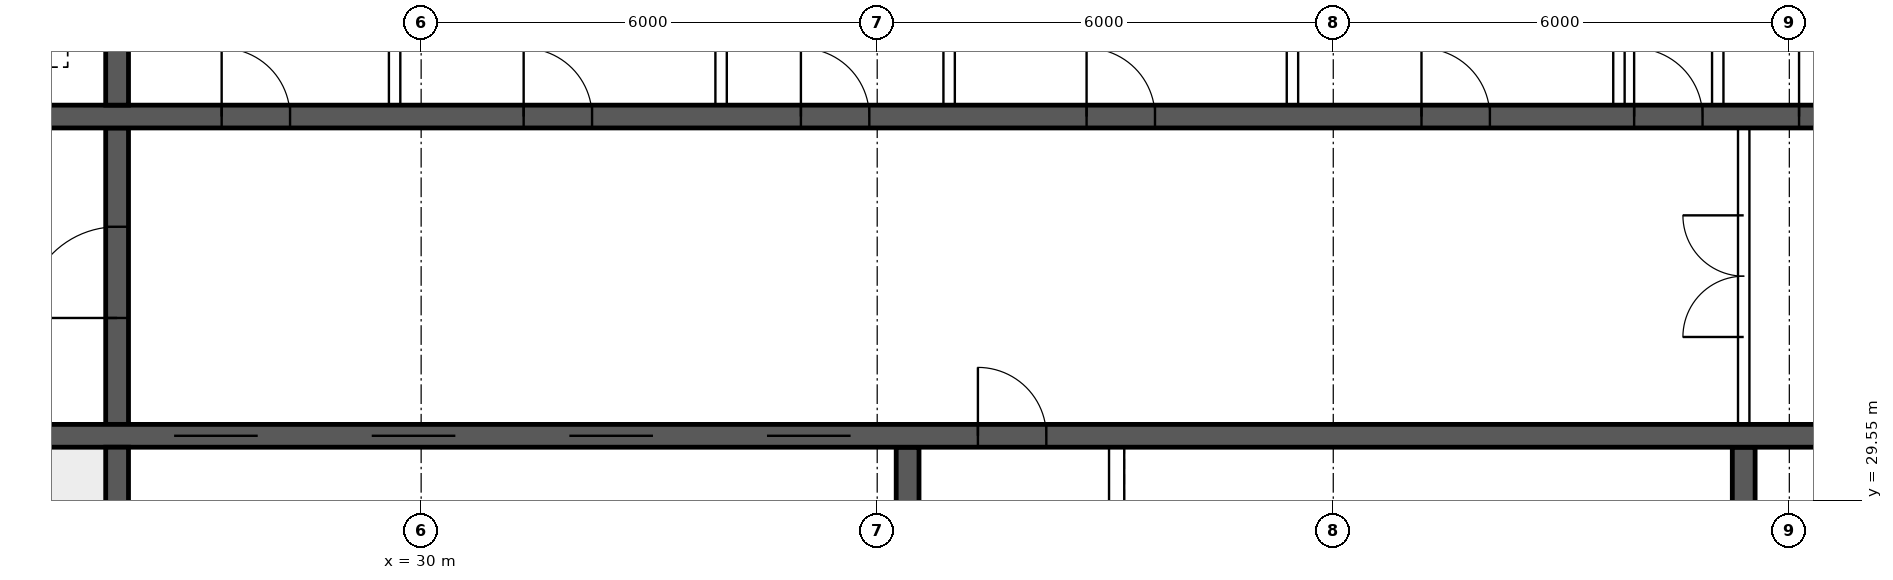
"""IFC4 building model, lengths in metres.
Left out: names, types, materials, properties, quantities, classifications, styles, units other than length and angle.
Written with IfcOpenShell. Run it as: python <this file> out.ifc"""

import sys

from ifc_helpers import new_model, si_unit, direction, frame, frame_2d, origin, place, context, subcontext, project, spatial, rectangle, extrude, element, fill, save


model = new_model("IFC4")
c1 = context("Model", 3, precision=1e-05, world=origin(), true_north=direction((0.0, 1.0)))
c2 = subcontext(c1, "Body", "Model", "MODEL_VIEW")
j1 = project(units=[si_unit("LENGTHUNIT", "METRE"), si_unit("PLANEANGLEUNIT", "RADIAN")], contexts=[c1])
p1 = place(None, origin())
s1 = spatial("IfcSite", under=j1, at=p1, CompositionType="ELEMENT")
p2 = place(p1, origin())
s2 = spatial("IfcBuilding", under=s1, at=p2, CompositionType="ELEMENT")
p3 = place(p2, frame((0.0, 0.0, 103.15)))
s3 = spatial("IfcBuildingStorey", under=s2, at=p3, CompositionType="ELEMENT", Elevation=103.15)
p4 = place(p3, frame((18.475, 30.4, 0.0), z_axis=(0.0, 0.0, 1.0), x_axis=(1.0, 0.0, 0.0)))
e1 = element("IfcWall", 1, at=p4, inside=s3, PredefinedType="SHEAR", context=c2, shape_type="SweptSolid", body=[
    extrude(rectangle(XDim=47.05, YDim=0.3, at=frame_2d((23.525, 0.0))), origin(), (0.0, 0.0, 1.0), 3.75),
])
p5 = place(p4, frame((0.4, 0.0, 0.0)))
e2 = element("IfcOpeningElement", 2, at=p5, cuts=e1, PredefinedType="OPENING", context=c2, shape_type="SweptSolid", body=[
    extrude(rectangle(XDim=1.0, YDim=2.1, at=frame_2d((0.5, 1.05))), frame((0.0, 0.16, 0.0), z_axis=(0.0, -1.0, 0.0), x_axis=(1.0, 0.0, 0.0)), (0.0, 0.0, 1.0), 0.32),
])
p6 = place(p4, frame((45.65, 0.0, 0.0)))
e3 = element("IfcOpeningElement", 3, at=p6, cuts=e1, PredefinedType="OPENING", context=c2, shape_type="SweptSolid", body=[
    extrude(rectangle(XDim=1.0, YDim=2.1, at=frame_2d((0.5, 1.05))), frame((0.0, 0.16, 0.0), z_axis=(0.0, -1.0, 0.0), x_axis=(1.0, 0.0, 0.0)), (0.0, 0.0, 1.0), 0.32),
])
p7 = place(p4, frame((8.275, 0.0, 0.0)))
e4 = element("IfcOpeningElement", 4, at=p7, cuts=e1, PredefinedType="OPENING", context=c2, shape_type="SweptSolid", body=[
    extrude(rectangle(XDim=1.1, YDim=2.1, at=frame_2d((0.55, 1.05))), frame((0.0, 0.16, 0.0), z_axis=(0.0, -1.0, 0.0), x_axis=(1.0, 0.0, 0.0)), (0.0, 0.0, 1.0), 0.32),
])
p8 = place(p4, frame((10.875, 0.0, 0.0)))
e5 = element("IfcOpeningElement", 5, at=p8, cuts=e1, PredefinedType="OPENING", context=c2, shape_type="SweptSolid", body=[
    extrude(rectangle(XDim=1.1, YDim=2.1, at=frame_2d((0.55, 1.05))), frame((0.0, 0.16, 0.0), z_axis=(0.0, -1.0, 0.0), x_axis=(1.0, 0.0, 0.0)), (0.0, 0.0, 1.0), 0.32),
])
p9 = place(p4, frame((13.475, 0.0, 0.0)))
e6 = element("IfcOpeningElement", 6, at=p9, cuts=e1, PredefinedType="OPENING", context=c2, shape_type="SweptSolid", body=[
    extrude(rectangle(XDim=1.1, YDim=2.1, at=frame_2d((0.55, 1.05))), frame((0.0, 0.16, 0.0), z_axis=(0.0, -1.0, 0.0), x_axis=(1.0, 0.0, 0.0)), (0.0, 0.0, 1.0), 0.32),
])
p10 = place(p4, frame((16.075, 0.0, 0.0)))
e7 = element("IfcOpeningElement", 7, at=p10, cuts=e1, PredefinedType="OPENING", context=c2, shape_type="SweptSolid", body=[
    extrude(rectangle(XDim=1.1, YDim=2.1, at=frame_2d((0.55, 1.05))), frame((0.0, 0.16, 0.0), z_axis=(0.0, -1.0, 0.0), x_axis=(1.0, 0.0, 0.0)), (0.0, 0.0, 1.0), 0.32),
])
p11 = place(p4, frame((18.85, 0.0, 0.0)))
e8 = element("IfcOpeningElement", 8, at=p11, cuts=e1, PredefinedType="OPENING", context=c2, shape_type="SweptSolid", body=[
    extrude(rectangle(XDim=0.9, YDim=2.1, at=frame_2d((0.45, 1.05))), frame((0.0, 0.16, 0.0), z_axis=(0.0, -1.0, 0.0), x_axis=(1.0, 0.0, 0.0)), (0.0, 0.0, 1.0), 0.32),
])
p12 = place(p4, frame((30.142, 0.0, 0.0)))
e9 = element("IfcOpeningElement", 9, at=p12, cuts=e1, PredefinedType="OPENING", context=c2, shape_type="SweptSolid", body=[
    extrude(rectangle(XDim=1.1, YDim=2.1, at=frame_2d((0.55, 1.05))), frame((0.0, 0.16, 0.0), z_axis=(0.0, -1.0, 0.0), x_axis=(1.0, 0.0, 0.0)), (0.0, 0.0, 1.0), 0.32),
])
p13 = place(p4, frame((33.675, 0.0, 0.0)))
e10 = element("IfcOpeningElement", 10, at=p13, cuts=e1, PredefinedType="OPENING", context=c2, shape_type="SweptSolid", body=[
    extrude(rectangle(XDim=1.1, YDim=2.1, at=frame_2d((0.55, 1.05))), frame((0.0, 0.16, 0.0), z_axis=(0.0, -1.0, 0.0), x_axis=(1.0, 0.0, 0.0)), (0.0, 0.0, 1.0), 0.32),
])
p14 = place(p4, frame((37.208, 0.0, 0.0)))
e11 = element("IfcOpeningElement", 11, at=p14, cuts=e1, PredefinedType="OPENING", context=c2, shape_type="SweptSolid", body=[
    extrude(rectangle(XDim=1.1, YDim=2.1, at=frame_2d((0.55, 1.05))), frame((0.0, 0.16, 0.0), z_axis=(0.0, -1.0, 0.0), x_axis=(1.0, 0.0, 0.0)), (0.0, 0.0, 1.0), 0.32),
])
p15 = place(p3, frame((18.475, 34.6, 0.0), z_axis=(0.0, 0.0, 1.0), x_axis=(1.0, 0.0, 0.0)))
e12 = element("IfcWall", 12, at=p15, inside=s3, PredefinedType="SHEAR", context=c2, shape_type="SweptSolid", body=[
    extrude(rectangle(XDim=47.05, YDim=0.3, at=frame_2d((23.525, 0.0))), origin(), (0.0, 0.0, 1.0), 3.75),
])
p16 = place(p15, frame((0.9, 0.0, 0.0)))
e13 = element("IfcOpeningElement", 13, at=p16, cuts=e12, PredefinedType="OPENING", context=c2, shape_type="SweptSolid", body=[
    extrude(rectangle(XDim=1.1, YDim=2.1, at=frame_2d((0.55, 1.05))), frame((0.0, 0.16, 0.0), z_axis=(0.0, -1.0, 0.0), x_axis=(1.0, 0.0, 0.0)), (0.0, 0.0, 1.0), 0.32),
])
p17 = place(p15, frame((45.05, 0.0, 0.0)))
e14 = element("IfcOpeningElement", 14, at=p17, cuts=e12, PredefinedType="OPENING", context=c2, shape_type="SweptSolid", body=[
    extrude(rectangle(XDim=1.1, YDim=2.1, at=frame_2d((0.55, 1.05))), frame((0.0, 0.16, 0.0), z_axis=(0.0, -1.0, 0.0), x_axis=(1.0, 0.0, 0.0)), (0.0, 0.0, 1.0), 0.32),
])
p18 = place(p15, frame((4.125, 0.0, 0.0)))
e15 = element("IfcOpeningElement", 15, at=p18, cuts=e12, PredefinedType="OPENING", context=c2, shape_type="SweptSolid", body=[
    extrude(rectangle(XDim=0.9, YDim=2.1, at=frame_2d((0.45, 1.05))), frame((0.0, 0.16, 0.0), z_axis=(0.0, -1.0, 0.0), x_axis=(1.0, 0.0, 0.0)), (0.0, 0.0, 1.0), 0.32),
])
p19 = place(p15, frame((42.025, 0.0, 0.0)))
e16 = element("IfcOpeningElement", 16, at=p19, cuts=e12, PredefinedType="OPENING", context=c2, shape_type="SweptSolid", body=[
    extrude(rectangle(XDim=0.9, YDim=2.1, at=frame_2d((0.45, 1.05))), frame((0.0, 0.16, 0.0), z_axis=(0.0, -1.0, 0.0), x_axis=(1.0, 0.0, 0.0)), (0.0, 0.0, 1.0), 0.32),
])
p20 = place(p15, frame((8.9, 0.0, 0.0)))
e17 = element("IfcOpeningElement", 17, at=p20, cuts=e12, PredefinedType="OPENING", context=c2, shape_type="SweptSolid", body=[
    extrude(rectangle(XDim=0.9, YDim=2.1, at=frame_2d((0.45, 1.05))), frame((0.0, 0.16, 0.0), z_axis=(0.0, -1.0, 0.0), x_axis=(1.0, 0.0, 0.0)), (0.0, 0.0, 1.0), 0.32),
])
p21 = place(p15, frame((12.874, 0.0, 0.0)))
e18 = element("IfcOpeningElement", 18, at=p21, cuts=e12, PredefinedType="OPENING", context=c2, shape_type="SweptSolid", body=[
    extrude(rectangle(XDim=0.9, YDim=2.1, at=frame_2d((0.45, 1.05))), frame((0.0, 0.16, 0.0), z_axis=(0.0, -1.0, 0.0), x_axis=(1.0, 0.0, 0.0)), (0.0, 0.0, 1.0), 0.32),
])
p22 = place(p15, frame((16.521, 0.0, 0.0)))
e19 = element("IfcOpeningElement", 19, at=p22, cuts=e12, PredefinedType="OPENING", context=c2, shape_type="SweptSolid", body=[
    extrude(rectangle(XDim=0.9, YDim=2.1, at=frame_2d((0.45, 1.05))), frame((0.0, 0.16, 0.0), z_axis=(0.0, -1.0, 0.0), x_axis=(1.0, 0.0, 0.0)), (0.0, 0.0, 1.0), 0.32),
])
p23 = place(p15, frame((20.28, 0.0, 0.0)))
e20 = element("IfcOpeningElement", 20, at=p23, cuts=e12, PredefinedType="OPENING", context=c2, shape_type="SweptSolid", body=[
    extrude(rectangle(XDim=0.9, YDim=2.1, at=frame_2d((0.45, 1.05))), frame((0.0, 0.16, 0.0), z_axis=(0.0, -1.0, 0.0), x_axis=(1.0, 0.0, 0.0)), (0.0, 0.0, 1.0), 0.32),
])
p24 = place(p15, frame((24.686, 0.0, 0.0)))
e21 = element("IfcOpeningElement", 21, at=p24, cuts=e12, PredefinedType="OPENING", context=c2, shape_type="SweptSolid", body=[
    extrude(rectangle(XDim=0.9, YDim=2.1, at=frame_2d((0.45, 1.05))), frame((0.0, 0.16, 0.0), z_axis=(0.0, -1.0, 0.0), x_axis=(1.0, 0.0, 0.0)), (0.0, 0.0, 1.0), 0.32),
])
p25 = place(p15, frame((27.483, 0.0, 0.0)))
e22 = element("IfcOpeningElement", 22, at=p25, cuts=e12, PredefinedType="OPENING", context=c2, shape_type="SweptSolid", body=[
    extrude(rectangle(XDim=0.9, YDim=2.1, at=frame_2d((0.45, 1.05))), frame((0.0, 0.16, 0.0), z_axis=(0.0, -1.0, 0.0), x_axis=(1.0, 0.0, 0.0)), (0.0, 0.0, 1.0), 0.32),
])
p26 = place(p15, frame((29.653, 0.0, 0.0)))
e23 = element("IfcOpeningElement", 23, at=p26, cuts=e12, PredefinedType="OPENING", context=c2, shape_type="SweptSolid", body=[
    extrude(rectangle(XDim=0.9, YDim=2.1, at=frame_2d((0.45, 1.05))), frame((0.0, 0.16, 0.0), z_axis=(0.0, -1.0, 0.0), x_axis=(1.0, 0.0, 0.0)), (0.0, 0.0, 1.0), 0.32),
])
p27 = place(p15, frame((33.452, 0.0, 0.0)))
e24 = element("IfcOpeningElement", 24, at=p27, cuts=e12, PredefinedType="OPENING", context=c2, shape_type="SweptSolid", body=[
    extrude(rectangle(XDim=0.9, YDim=2.1, at=frame_2d((0.45, 1.05))), frame((0.0, 0.16, 0.0), z_axis=(0.0, -1.0, 0.0), x_axis=(1.0, 0.0, 0.0)), (0.0, 0.0, 1.0), 0.32),
])
p28 = place(p15, frame((37.403, 0.0, 0.0)))
e25 = element("IfcOpeningElement", 25, at=p28, cuts=e12, PredefinedType="OPENING", context=c2, shape_type="SweptSolid", body=[
    extrude(rectangle(XDim=0.9, YDim=2.1, at=frame_2d((0.45, 1.05))), frame((0.0, 0.16, 0.0), z_axis=(0.0, -1.0, 0.0), x_axis=(1.0, 0.0, 0.0)), (0.0, 0.0, 1.0), 0.32),
])
p29 = place(p3, frame((26.0, 26.275, 0.0), z_axis=(0.0, 0.0, 1.0), x_axis=(0.0, 1.0, 0.0)))
e26 = element("IfcWall", 26, at=p29, inside=s3, PredefinedType="SHEAR", context=c2, shape_type="SweptSolid", body=[
    extrude(rectangle(XDim=3.975, YDim=0.3, at=frame_2d((1.988, 0.0))), origin(), (0.0, 0.0, 1.0), 3.75),
])
p30 = place(p3, frame((26.0, 30.55, 0.0), z_axis=(0.0, 0.0, 1.0), x_axis=(0.0, 1.0, 0.0)))
e27 = element("IfcWall", 27, at=p30, inside=s3, PredefinedType="SHEAR", context=c2, shape_type="SweptSolid", body=[
    extrude(rectangle(XDim=3.9, YDim=0.3, at=frame_2d((1.95, 0.0))), origin(), (0.0, 0.0, 1.0), 3.75),
])
p31 = place(p30, frame((1.4, 0.0, 0.0)))
e28 = element("IfcOpeningElement", 28, at=p31, cuts=e27, PredefinedType="OPENING", context=c2, shape_type="SweptSolid", body=[
    extrude(rectangle(XDim=1.2, YDim=2.1, at=frame_2d((0.6, 1.05))), frame((0.0, 0.16, 0.0), z_axis=(0.0, -1.0, 0.0), x_axis=(1.0, 0.0, 0.0)), (0.0, 0.0, 1.0), 0.32),
])
p32 = place(p3, frame((26.0, 34.75, 0.0), z_axis=(0.0, 0.0, 1.0), x_axis=(0.0, 1.0, 0.0)))
e29 = element("IfcWall", 29, at=p32, inside=s3, PredefinedType="SHEAR", context=c2, shape_type="SweptSolid", body=[
    extrude(rectangle(XDim=2.975, YDim=0.3, at=frame_2d((1.488, 0.0))), origin(), (0.0, 0.0, 1.0), 3.75),
])
for number, where, z_axis, x_axis in (
    (30, (36.4, 26.275, 0.0), (0.0, 0.0, 1.0), (0.0, 1.0, 0.0)),
    (31, (47.4, 26.275, 0.0), (0.0, 0.0, 1.0), (0.0, 1.0, 0.0)),
):
    element("IfcWall", number, at=place(p3, frame(where, z_axis=z_axis, x_axis=x_axis)), inside=s3, PredefinedType="SHEAR", context=c2, shape_type="SweptSolid", body=[
        extrude(rectangle(XDim=3.975, YDim=0.3, at=frame_2d((1.988, 0.0))), origin(), (0.0, 0.0, 1.0), 3.75),
    ])
p33 = place(p3, frame((47.4, 30.55, 0.0), z_axis=(0.0, 0.0, 1.0), x_axis=(0.0, 1.0, 0.0)))
e32 = element("IfcWall", 32, at=p33, inside=s3, PredefinedType="SOLIDWALL", context=c2, shape_type="SweptSolid", body=[
    extrude(rectangle(XDim=3.9, YDim=0.15, at=frame_2d((1.95, 0.0))), origin(), (0.0, 0.0, 1.0), 3.5),
])
p34 = place(p33, frame((1.15, 0.0, 0.0)))
e33 = element("IfcOpeningElement", 33, at=p34, cuts=e32, PredefinedType="OPENING", context=c2, shape_type="SweptSolid", body=[
    extrude(rectangle(XDim=1.6, YDim=2.1, at=frame_2d((0.8, 1.05))), frame((0.0, 0.085, 0.0), z_axis=(0.0, -1.0, 0.0), x_axis=(1.0, 0.0, 0.0)), (0.0, 0.0, 1.0), 0.17),
])
for number, where, z_axis, x_axis in (
    (34, (29.651, 34.75, 0.0), (0.0, 0.0, 1.0), (0.0, 1.0, 0.0)),
    (35, (33.946, 34.75, 0.0), (0.0, 0.0, 1.0), (0.0, 1.0, 0.0)),
    (36, (36.946, 34.75, 0.0), (0.0, 0.0, 1.0), (0.0, 1.0, 0.0)),
    (37, (41.463, 34.75, 0.0), (0.0, 0.0, 1.0), (0.0, 1.0, 0.0)),
    (38, (45.758, 34.75, 0.0), (0.0, 0.0, 1.0), (0.0, 1.0, 0.0)),
    (39, (47.058, 34.75, 0.0), (0.0, 0.0, 1.0), (0.0, 1.0, 0.0)),
):
    element("IfcWall", number, at=place(p3, frame(where, z_axis=z_axis, x_axis=x_axis)), inside=s3, PredefinedType="SOLIDWALL", context=c2, shape_type="SweptSolid", body=[
        extrude(rectangle(XDim=2.975, YDim=0.15, at=frame_2d((1.488, 0.0))), origin(), (0.0, 0.0, 1.0), 3.5),
    ])
p35 = place(p3, frame((39.15, 26.275, 0.0), z_axis=(0.0, 0.0, 1.0), x_axis=(0.0, 1.0, 0.0)))
e40 = element("IfcWall", 40, at=p35, inside=s3, PredefinedType="SOLIDWALL", context=c2, shape_type="SweptSolid", body=[
    extrude(rectangle(XDim=3.975, YDim=0.2, at=frame_2d((1.988, 0.0))), origin(), (0.0, 0.0, 1.0), 3.5),
])
p36 = place(p34, origin())
e41 = element("IfcDoor", 41, at=p36, inside=s3, OperationType="DOUBLE_DOOR_SINGLE_SWING", PredefinedType="DOOR", context=c2, shape_type="SweptSolid", body=[
    extrude(rectangle(XDim=1.6, YDim=2.1, at=frame_2d((0.8, 1.05))), frame((0.0, 0.025, 0.0), z_axis=(0.0, -1.0, 0.0), x_axis=(1.0, 0.0, 0.0)), (0.0, 0.0, 1.0), 0.05),
])
fill(e33, e41)
p37 = place(p31, origin())
e42 = element("IfcDoor", 42, at=p37, inside=s3, OperationType="SINGLE_SWING_LEFT", PredefinedType="DOOR", context=c2, shape_type="SweptSolid", body=[
    extrude(rectangle(XDim=1.2, YDim=2.1, at=frame_2d((0.6, 1.05))), frame((0.0, 0.025, 0.0), z_axis=(0.0, -1.0, 0.0), x_axis=(1.0, 0.0, 0.0)), (0.0, 0.0, 1.0), 0.05),
])
fill(e28, e42)
p38 = place(p20, origin())
e43 = element("IfcDoor", 43, at=p38, inside=s3, OperationType="SINGLE_SWING_LEFT", PredefinedType="DOOR", context=c2, shape_type="SweptSolid", body=[
    extrude(rectangle(XDim=0.9, YDim=2.1, at=frame_2d((0.45, 1.05))), frame((0.0, 0.025, 0.0), z_axis=(0.0, -1.0, 0.0), x_axis=(1.0, 0.0, 0.0)), (0.0, 0.0, 1.0), 0.05),
])
fill(e17, e43)
p39 = place(p21, origin())
e44 = element("IfcDoor", 44, at=p39, inside=s3, OperationType="SINGLE_SWING_LEFT", PredefinedType="DOOR", context=c2, shape_type="SweptSolid", body=[
    extrude(rectangle(XDim=0.9, YDim=2.1, at=frame_2d((0.45, 1.05))), frame((0.0, 0.025, 0.0), z_axis=(0.0, -1.0, 0.0), x_axis=(1.0, 0.0, 0.0)), (0.0, 0.0, 1.0), 0.05),
])
fill(e18, e44)
p40 = place(p22, origin())
e45 = element("IfcDoor", 45, at=p40, inside=s3, OperationType="SINGLE_SWING_LEFT", PredefinedType="DOOR", context=c2, shape_type="SweptSolid", body=[
    extrude(rectangle(XDim=0.9, YDim=2.1, at=frame_2d((0.45, 1.05))), frame((0.0, 0.025, 0.0), z_axis=(0.0, -1.0, 0.0), x_axis=(1.0, 0.0, 0.0)), (0.0, 0.0, 1.0), 0.05),
])
fill(e19, e45)
p41 = place(p23, origin())
e46 = element("IfcDoor", 46, at=p41, inside=s3, OperationType="SINGLE_SWING_LEFT", PredefinedType="DOOR", context=c2, shape_type="SweptSolid", body=[
    extrude(rectangle(XDim=0.9, YDim=2.1, at=frame_2d((0.45, 1.05))), frame((0.0, 0.025, 0.0), z_axis=(0.0, -1.0, 0.0), x_axis=(1.0, 0.0, 0.0)), (0.0, 0.0, 1.0), 0.05),
])
fill(e20, e46)
p42 = place(p24, origin())
e47 = element("IfcDoor", 47, at=p42, inside=s3, OperationType="SINGLE_SWING_LEFT", PredefinedType="DOOR", context=c2, shape_type="SweptSolid", body=[
    extrude(rectangle(XDim=0.9, YDim=2.1, at=frame_2d((0.45, 1.05))), frame((0.0, 0.025, 0.0), z_axis=(0.0, -1.0, 0.0), x_axis=(1.0, 0.0, 0.0)), (0.0, 0.0, 1.0), 0.05),
])
fill(e21, e47)
p43 = place(p25, origin())
e48 = element("IfcDoor", 48, at=p43, inside=s3, OperationType="SINGLE_SWING_LEFT", PredefinedType="DOOR", context=c2, shape_type="SweptSolid", body=[
    extrude(rectangle(XDim=0.9, YDim=2.1, at=frame_2d((0.45, 1.05))), frame((0.0, 0.025, 0.0), z_axis=(0.0, -1.0, 0.0), x_axis=(1.0, 0.0, 0.0)), (0.0, 0.0, 1.0), 0.05),
])
fill(e22, e48)
p44 = place(p26, origin())
e49 = element("IfcDoor", 49, at=p44, inside=s3, OperationType="SINGLE_SWING_LEFT", PredefinedType="DOOR", context=c2, shape_type="SweptSolid", body=[
    extrude(rectangle(XDim=0.9, YDim=2.1, at=frame_2d((0.45, 1.05))), frame((0.0, 0.025, 0.0), z_axis=(0.0, -1.0, 0.0), x_axis=(1.0, 0.0, 0.0)), (0.0, 0.0, 1.0), 0.05),
])
fill(e23, e49)
p45 = place(p7, origin())
e50 = element("IfcDoor", 50, at=p45, inside=s3, OperationType="DOUBLE_DOOR_SLIDING", PredefinedType="DOOR", context=c2, shape_type="SweptSolid", body=[
    extrude(rectangle(XDim=1.1, YDim=2.1, at=frame_2d((0.55, 1.05))), frame((0.0, 0.025, 0.0), z_axis=(0.0, -1.0, 0.0), x_axis=(1.0, 0.0, 0.0)), (0.0, 0.0, 1.0), 0.05),
])
fill(e4, e50)
p46 = place(p8, origin())
e51 = element("IfcDoor", 51, at=p46, inside=s3, OperationType="DOUBLE_DOOR_SLIDING", PredefinedType="DOOR", context=c2, shape_type="SweptSolid", body=[
    extrude(rectangle(XDim=1.1, YDim=2.1, at=frame_2d((0.55, 1.05))), frame((0.0, 0.025, 0.0), z_axis=(0.0, -1.0, 0.0), x_axis=(1.0, 0.0, 0.0)), (0.0, 0.0, 1.0), 0.05),
])
fill(e5, e51)
p47 = place(p9, origin())
e52 = element("IfcDoor", 52, at=p47, inside=s3, OperationType="DOUBLE_DOOR_SLIDING", PredefinedType="DOOR", context=c2, shape_type="SweptSolid", body=[
    extrude(rectangle(XDim=1.1, YDim=2.1, at=frame_2d((0.55, 1.05))), frame((0.0, 0.025, 0.0), z_axis=(0.0, -1.0, 0.0), x_axis=(1.0, 0.0, 0.0)), (0.0, 0.0, 1.0), 0.05),
])
fill(e6, e52)
p48 = place(p10, origin())
e53 = element("IfcDoor", 53, at=p48, inside=s3, OperationType="DOUBLE_DOOR_SLIDING", PredefinedType="DOOR", context=c2, shape_type="SweptSolid", body=[
    extrude(rectangle(XDim=1.1, YDim=2.1, at=frame_2d((0.55, 1.05))), frame((0.0, 0.025, 0.0), z_axis=(0.0, -1.0, 0.0), x_axis=(1.0, 0.0, 0.0)), (0.0, 0.0, 1.0), 0.05),
])
fill(e7, e53)
p49 = place(p11, origin())
e54 = element("IfcDoor", 54, at=p49, inside=s3, OperationType="SINGLE_SWING_LEFT", PredefinedType="DOOR", context=c2, shape_type="SweptSolid", body=[
    extrude(rectangle(XDim=0.9, YDim=2.1, at=frame_2d((0.45, 1.05))), frame((0.0, 0.025, 0.0), z_axis=(0.0, -1.0, 0.0), x_axis=(1.0, 0.0, 0.0)), (0.0, 0.0, 1.0), 0.05),
])
fill(e8, e54)
save(model, sys.argv[1])
